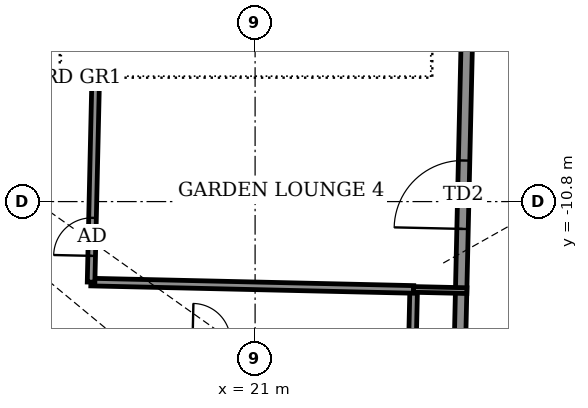
"""IFC4 building model, lengths in metres.
Left out: names, types, materials, properties, quantities, classifications, styles, units other than length and angle.
Written with IfcOpenShell. Run it as: python <this file> out.ifc"""

import sys

from ifc_helpers import new_model, si_unit, direction, frame, frame_2d, origin, place, context, subcontext, project, spatial, rectangle, extrude, element, fill, save


model = new_model("IFC4")
c1 = context("Model", 3, precision=1e-05, world=origin(), true_north=direction((0.0, 1.0)))
c2 = subcontext(c1, "Body", "Model", "MODEL_VIEW")
j1 = project(units=[si_unit("LENGTHUNIT", "METRE"), si_unit("PLANEANGLEUNIT", "RADIAN")], contexts=[c1])
p1 = place(None, origin())
s1 = spatial("IfcSite", under=j1, at=p1, CompositionType="ELEMENT")
p2 = place(p1, origin())
s2 = spatial("IfcBuilding", under=s1, at=p2, CompositionType="ELEMENT")
p3 = place(p2, frame((0.0, 0.0, 329.7)))
s3 = spatial("IfcBuildingStorey", under=s2, at=p3, CompositionType="ELEMENT", Elevation=329.7)
p4 = place(p3, frame((26.298, -18.588, 0.0), z_axis=(0.0, 0.0, 1.0), x_axis=(0.022677140298, 0.999742840588, 0.0)))
e1 = element("IfcWall", 1, at=p4, inside=s3, PredefinedType="SOLIDWALL", context=c2, shape_type="SweptSolid", body=[
    extrude(rectangle(XDim=12.779, YDim=0.3, at=frame_2d((6.39, 0.0))), origin(), (0.0, 0.0, 1.0), 2.35),
])
p5 = place(p4, frame((1.75, 0.0, 0.0)))
e2 = element("IfcOpeningElement", 2, at=p5, cuts=e1, PredefinedType="OPENING", context=c2, shape_type="SweptSolid", body=[
    extrude(rectangle(XDim=1.8, YDim=2.0, at=frame_2d((0.9, 1.0))), frame((0.0, 0.16, 0.0), z_axis=(0.0, -1.0, 0.0), x_axis=(1.0, 0.0, 0.0)), (0.0, 0.0, 1.0), 0.32),
])
p6 = place(p4, frame((7.071, 0.0, 0.0)))
e3 = element("IfcOpeningElement", 3, at=p6, cuts=e1, PredefinedType="OPENING", context=c2, shape_type="SweptSolid", body=[
    extrude(rectangle(XDim=1.8, YDim=2.0, at=frame_2d((0.9, 1.0))), frame((0.0, 0.16, 0.0), z_axis=(0.0, -1.0, 0.0), x_axis=(1.0, 0.0, 0.0)), (0.0, 0.0, 1.0), 0.32),
])
p7 = place(p3, frame((-27.598, -13.414, 0.0), z_axis=(0.0, 0.0, 1.0), x_axis=(0.999742489831, -0.022692598482, 0.0)))
e4 = element("IfcWall", 4, at=p7, inside=s3, PredefinedType="PARTITIONING", context=c2, shape_type="SweptSolid", body=[
    extrude(rectangle(XDim=52.75, YDim=0.2, at=frame_2d((26.375, 0.0))), origin(), (0.0, 0.0, 1.0), 2.1),
])
p8 = place(p7, frame((0.871, 0.0, 0.0)))
e5 = element("IfcOpeningElement", 5, at=p8, cuts=e4, PredefinedType="OPENING", context=c2, shape_type="SweptSolid", body=[
    extrude(rectangle(XDim=1.0, YDim=2.1, at=frame_2d((0.5, 1.05))), frame((0.0, 0.11, 0.0), z_axis=(0.0, -1.0, 0.0), x_axis=(1.0, 0.0, 0.0)), (0.0, 0.0, 1.0), 0.22),
])
p9 = place(p7, frame((8.35, 0.0, 0.0)))
e6 = element("IfcOpeningElement", 6, at=p9, cuts=e4, PredefinedType="OPENING", context=c2, shape_type="SweptSolid", body=[
    extrude(rectangle(XDim=0.9, YDim=2.1, at=frame_2d((0.45, 1.05))), frame((0.0, 0.11, 0.0), z_axis=(0.0, -1.0, 0.0), x_axis=(1.0, 0.0, 0.0)), (0.0, 0.0, 1.0), 0.22),
])
p10 = place(p7, frame((13.15, 0.0, 0.0)))
e7 = element("IfcOpeningElement", 7, at=p10, cuts=e4, PredefinedType="OPENING", context=c2, shape_type="SweptSolid", body=[
    extrude(rectangle(XDim=1.0, YDim=2.1, at=frame_2d((0.5, 1.05))), frame((0.0, 0.11, 0.0), z_axis=(0.0, -1.0, 0.0), x_axis=(1.0, 0.0, 0.0)), (0.0, 0.0, 1.0), 0.22),
])
p11 = place(p7, frame((10.75, 0.0, 0.0)))
e8 = element("IfcOpeningElement", 8, at=p11, cuts=e4, PredefinedType="OPENING", context=c2, shape_type="SweptSolid", body=[
    extrude(rectangle(XDim=0.9, YDim=2.1, at=frame_2d((0.45, 1.05))), frame((0.0, 0.11, 0.0), z_axis=(0.0, -1.0, 0.0), x_axis=(1.0, 0.0, 0.0)), (0.0, 0.0, 1.0), 0.22),
])
p12 = place(p7, frame((19.625, 0.0, 0.0)))
e9 = element("IfcOpeningElement", 9, at=p12, cuts=e4, PredefinedType="OPENING", context=c2, shape_type="SweptSolid", body=[
    extrude(rectangle(XDim=1.0, YDim=2.1, at=frame_2d((0.5, 1.05))), frame((0.0, 0.11, 0.0), z_axis=(0.0, -1.0, 0.0), x_axis=(1.0, 0.0, 0.0)), (0.0, 0.0, 1.0), 0.22),
])
p13 = place(p7, frame((26.874, 0.0, 0.0)))
e10 = element("IfcOpeningElement", 10, at=p13, cuts=e4, PredefinedType="OPENING", context=c2, shape_type="SweptSolid", body=[
    extrude(rectangle(XDim=1.0, YDim=2.1, at=frame_2d((0.5, 1.05))), frame((0.0, 0.11, 0.0), z_axis=(0.0, -1.0, 0.0), x_axis=(1.0, 0.0, 0.0)), (0.0, 0.0, 1.0), 0.22),
])
p14 = place(p7, frame((33.05, 0.0, 0.0)))
e11 = element("IfcOpeningElement", 11, at=p14, cuts=e4, PredefinedType="OPENING", context=c2, shape_type="SweptSolid", body=[
    extrude(rectangle(XDim=1.0, YDim=2.1, at=frame_2d((0.5, 1.05))), frame((0.0, 0.11, 0.0), z_axis=(0.0, -1.0, 0.0), x_axis=(1.0, 0.0, 0.0)), (0.0, 0.0, 1.0), 0.22),
])
p15 = place(p7, frame((35.3, 0.0, 0.0)))
e12 = element("IfcOpeningElement", 12, at=p15, cuts=e4, PredefinedType="OPENING", context=c2, shape_type="SweptSolid", body=[
    extrude(rectangle(XDim=0.9, YDim=2.1, at=frame_2d((0.45, 1.05))), frame((0.0, 0.11, 0.0), z_axis=(0.0, -1.0, 0.0), x_axis=(1.0, 0.0, 0.0)), (0.0, 0.0, 1.0), 0.22),
])
p16 = place(p7, frame((40.1, 0.0, 0.0)))
e13 = element("IfcOpeningElement", 13, at=p16, cuts=e4, PredefinedType="OPENING", context=c2, shape_type="SweptSolid", body=[
    extrude(rectangle(XDim=1.0, YDim=2.1, at=frame_2d((0.5, 1.05))), frame((0.0, 0.11, 0.0), z_axis=(0.0, -1.0, 0.0), x_axis=(1.0, 0.0, 0.0)), (0.0, 0.0, 1.0), 0.22),
])
p17 = place(p7, frame((37.7, 0.0, 0.0)))
e14 = element("IfcOpeningElement", 14, at=p17, cuts=e4, PredefinedType="OPENING", context=c2, shape_type="SweptSolid", body=[
    extrude(rectangle(XDim=0.9, YDim=2.1, at=frame_2d((0.45, 1.05))), frame((0.0, 0.11, 0.0), z_axis=(0.0, -1.0, 0.0), x_axis=(1.0, 0.0, 0.0)), (0.0, 0.0, 1.0), 0.22),
])
p18 = place(p7, frame((46.964, 0.0, 0.0)))
e15 = element("IfcOpeningElement", 15, at=p18, cuts=e4, PredefinedType="OPENING", context=c2, shape_type="SweptSolid", body=[
    extrude(rectangle(XDim=1.0, YDim=2.1, at=frame_2d((0.5, 1.05))), frame((0.0, 0.11, 0.0), z_axis=(0.0, -1.0, 0.0), x_axis=(1.0, 0.0, 0.0)), (0.0, 0.0, 1.0), 0.22),
])
p19 = place(p7, frame((42.4, 0.0, 0.0)))
e16 = element("IfcOpeningElement", 16, at=p19, cuts=e4, PredefinedType="OPENING", context=c2, shape_type="SweptSolid", body=[
    extrude(rectangle(XDim=0.9, YDim=2.1, at=frame_2d((0.45, 1.05))), frame((0.0, 0.11, 0.0), z_axis=(0.0, -1.0, 0.0), x_axis=(1.0, 0.0, 0.0)), (0.0, 0.0, 1.0), 0.22),
])
p20 = place(p3, frame((25.138, -14.611, 0.0), z_axis=(0.0, 0.0, 1.0), x_axis=(0.022780545013, 0.999740489712, 0.0)))
e17 = element("IfcWall", 17, at=p20, inside=s3, PredefinedType="PARTITIONING", context=c2, shape_type="SweptSolid", body=[
    extrude(rectangle(XDim=1.5, YDim=0.2, at=frame_2d((0.75, 0.0))), origin(), (0.0, 0.0, 1.0), 4.05),
])
p21 = place(p3, frame((16.679, -12.918, 0.0), z_axis=(0.0, 0.0, 1.0), x_axis=(0.999741598108, -0.022731850181, 0.0)))
e18 = element("IfcWall", 18, at=p21, inside=s3, PredefinedType="PARTITIONING", context=c2, shape_type="SweptSolid", body=[
    extrude(rectangle(XDim=8.495, YDim=0.2, at=frame_2d((4.248, 0.0))), origin(), (0.0, 0.0, 1.0), 2.35),
])
p22 = place(p3, frame((16.684, -12.919, 0.0), z_axis=(0.0, 0.0, 1.0), x_axis=(0.022667483124, 0.999743059595, 0.0)))
e19 = element("IfcWall", 19, at=p22, inside=s3, PredefinedType="PARTITIONING", context=c2, shape_type="SweptSolid", body=[
    extrude(rectangle(XDim=5.245, YDim=0.2, at=frame_2d((2.623, 0.0))), origin(), (0.0, 0.0, 1.0), 2.35),
])
p23 = place(p22, frame((0.691, 0.0, 0.0)))
e20 = element("IfcOpeningElement", 20, at=p23, cuts=e19, PredefinedType="OPENING", context=c2, shape_type="SweptSolid", body=[
    extrude(rectangle(XDim=1.0, YDim=2.1, at=frame_2d((0.5, 1.05))), frame((0.0, 0.11, 0.0), z_axis=(0.0, -1.0, 0.0), x_axis=(1.0, 0.0, 0.0)), (0.0, 0.0, 1.0), 0.22),
])
p24 = place(p3, frame((25.168, -13.111, 0.0), z_axis=(0.0, 0.0, 1.0), x_axis=(0.999740667531, -0.022772739949, 0.0)))
e21 = element("IfcWall", 21, at=p24, inside=s3, PredefinedType="PARTITIONING", context=c2, shape_type="SweptSolid", body=[
    extrude(rectangle(XDim=1.404, YDim=0.15, at=frame_2d((0.702, 0.0))), origin(), (0.0, 0.0, 1.0), 4.05),
])
p25 = place(p6, origin())
e22 = element("IfcDoor", 22, at=p25, inside=s3, OperationType="DOUBLE_DOOR_SINGLE_SWING", PredefinedType="DOOR", context=c2, shape_type="SweptSolid", body=[
    extrude(rectangle(XDim=1.8, YDim=2.0, at=frame_2d((0.9, 1.0))), frame((0.0, 0.025, 0.0), z_axis=(0.0, -1.0, 0.0), x_axis=(1.0, 0.0, 0.0)), (0.0, 0.0, 1.0), 0.05),
])
fill(e3, e22)
p26 = place(p23, origin())
e23 = element("IfcDoor", 23, at=p26, inside=s3, OperationType="SINGLE_SWING_RIGHT", PredefinedType="DOOR", context=c2, shape_type="SweptSolid", body=[
    extrude(rectangle(XDim=1.0, YDim=2.1, at=frame_2d((0.5, 1.05))), frame((0.0, 0.025, 0.0), z_axis=(0.0, -1.0, 0.0), x_axis=(1.0, 0.0, 0.0)), (0.0, 0.0, 1.0), 0.05),
])
fill(e20, e23)
save(model, sys.argv[1])
